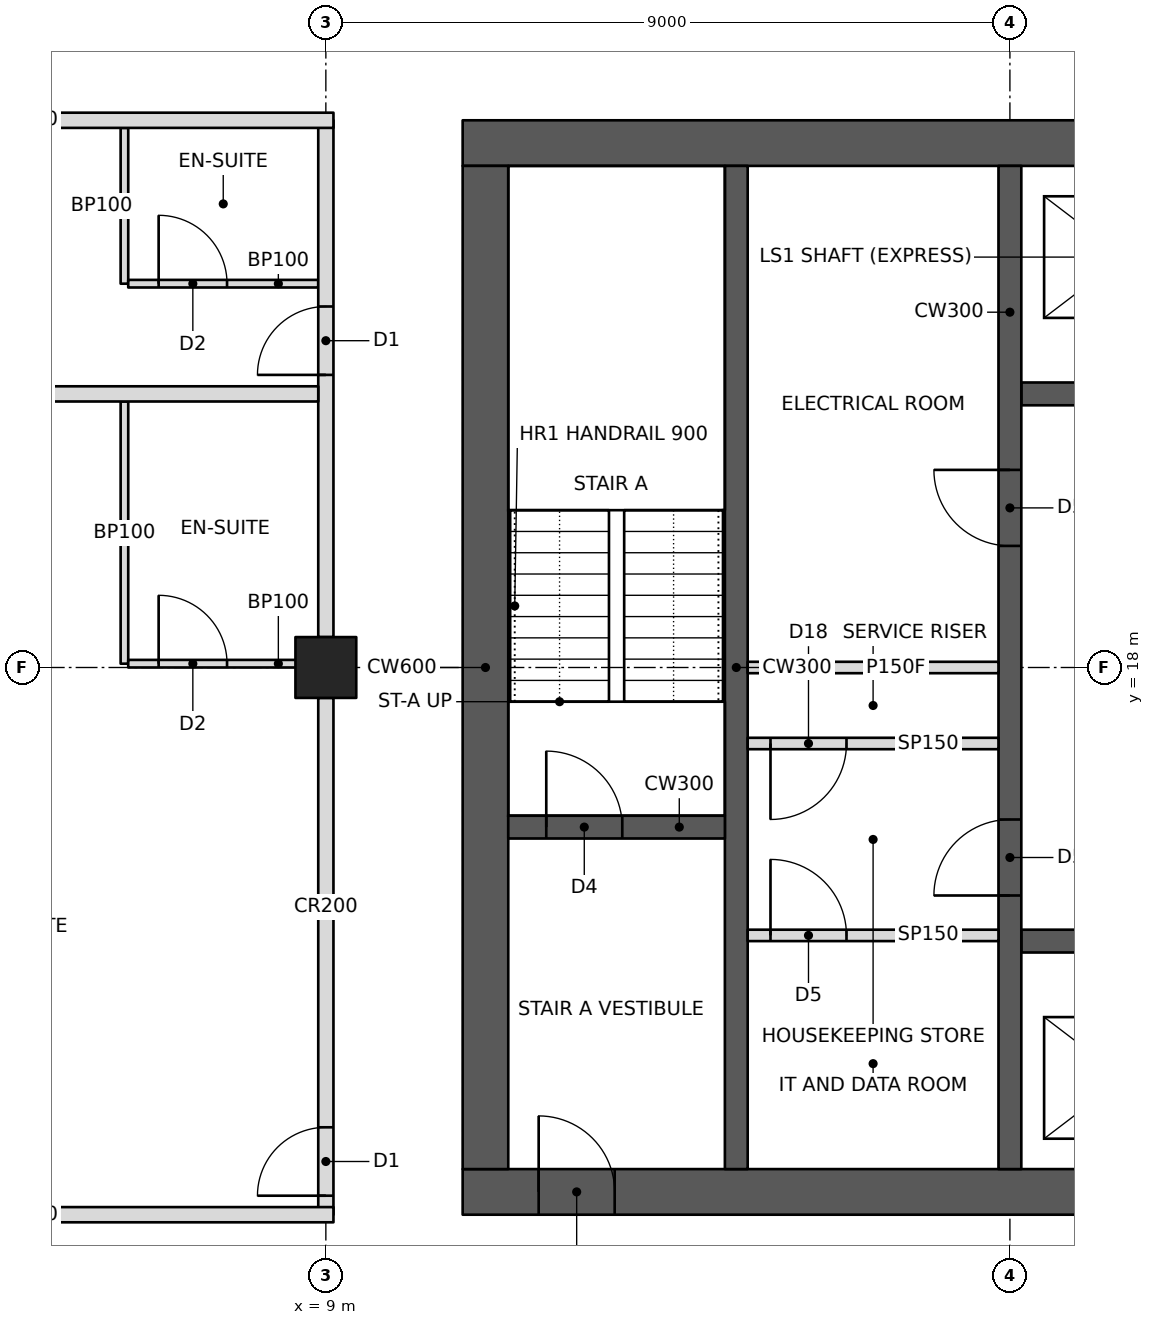
"""IFC4 building model, lengths in metres.
Left out: names, types, materials, properties, quantities, classifications, styles, units other than length and angle.
Written with IfcOpenShell. Run it as: python <this file> out.ifc"""

import sys

from ifc_helpers import new_model, si_unit, direction, frame, frame_2d, origin, origin_2d, place, context, subcontext, project, spatial, rectangle, hollow_rectangle, extrude, element, fill, save


model = new_model("IFC4")
c1 = context("Model", 3, precision=1e-05, world=origin(), true_north=direction((0.0, 1.0)))
c2 = subcontext(c1, "Body", "Model", "MODEL_VIEW")
j1 = project(units=[si_unit("LENGTHUNIT", "METRE"), si_unit("PLANEANGLEUNIT", "RADIAN")], contexts=[c1])
p1 = place(None, origin())
s1 = spatial("IfcSite", under=j1, at=p1, CompositionType="ELEMENT")
p2 = place(p1, origin())
s2 = spatial("IfcBuilding", under=s1, at=p2, CompositionType="ELEMENT")
p3 = place(p2, frame((0.0, 0.0, 124.8)))
s3 = spatial("IfcBuildingStorey", under=s2, at=p3, CompositionType="ELEMENT", Elevation=124.8)
p4 = place(p3, frame((9.0, 18.0, 0.0), z_axis=(0.0, 0.0, 1.0), x_axis=(1.0, 0.0, 0.0)))
e1 = element("IfcColumn", 1, at=p4, inside=s3, PredefinedType="COLUMN", context=c2, shape_type="SweptSolid", body=[
    extrude(hollow_rectangle(XDim=0.8, YDim=0.8, WallThickness=0.07, at=origin_2d()), origin(), (0.0, 0.0, 1.0), 3.4),
])
p5 = place(p3, frame((10.8, 11.1, 0.0), z_axis=(0.0, 0.0, 1.0), x_axis=(1.0, 0.0, 0.0)))
e2 = element("IfcWall", 2, at=p5, inside=s3, PredefinedType="SHEAR", context=c2, shape_type="SweptSolid", body=[
    extrude(rectangle(XDim=23.4, YDim=0.6, at=frame_2d((11.7, 0.0))), origin(), (0.0, 0.0, 1.0), 3.4),
])
p6 = place(p5, frame((1.0, 0.0, 0.0)))
e3 = element("IfcOpeningElement", 3, at=p6, cuts=e2, PredefinedType="OPENING", context=c2, shape_type="SweptSolid", body=[
    extrude(rectangle(XDim=1.0, YDim=2.1, at=frame_2d((0.5, 1.05))), frame((0.0, 0.31, 0.0), z_axis=(0.0, -1.0, 0.0), x_axis=(1.0, 0.0, 0.0)), (0.0, 0.0, 1.0), 0.62),
])
p7 = place(p5, frame((17.2, 0.0, 0.0)))
e4 = element("IfcOpeningElement", 4, at=p7, cuts=e2, PredefinedType="OPENING", context=c2, shape_type="SweptSolid", body=[
    extrude(rectangle(XDim=1.8, YDim=2.1, at=frame_2d((0.9, 1.05))), frame((0.0, 0.31, 0.0), z_axis=(0.0, -1.0, 0.0), x_axis=(1.0, 0.0, 0.0)), (0.0, 0.0, 1.0), 0.62),
])
p8 = place(p3, frame((10.8, 24.9, 0.0), z_axis=(0.0, 0.0, 1.0), x_axis=(1.0, 0.0, 0.0)))
e5 = element("IfcWall", 5, at=p8, inside=s3, PredefinedType="SHEAR", context=c2, shape_type="SweptSolid", body=[
    extrude(rectangle(XDim=23.4, YDim=0.6, at=frame_2d((11.7, 0.0))), origin(), (0.0, 0.0, 1.0), 3.4),
])
p9 = place(p8, frame((17.2, 0.0, 0.0)))
e6 = element("IfcOpeningElement", 6, at=p9, cuts=e5, PredefinedType="OPENING", context=c2, shape_type="SweptSolid", body=[
    extrude(rectangle(XDim=1.8, YDim=2.1, at=frame_2d((0.9, 1.05))), frame((0.0, 0.31, 0.0), z_axis=(0.0, -1.0, 0.0), x_axis=(1.0, 0.0, 0.0)), (0.0, 0.0, 1.0), 0.62),
])
p10 = place(p8, frame((21.1, 0.0, 0.0)))
e7 = element("IfcOpeningElement", 7, at=p10, cuts=e5, PredefinedType="OPENING", context=c2, shape_type="SweptSolid", body=[
    extrude(rectangle(XDim=1.0, YDim=2.1, at=frame_2d((0.5, 1.05))), frame((0.0, 0.31, 0.0), z_axis=(0.0, -1.0, 0.0), x_axis=(1.0, 0.0, 0.0)), (0.0, 0.0, 1.0), 0.62),
])
p11 = place(p3, frame((11.1, 11.4, 0.0), z_axis=(0.0, 0.0, 1.0), x_axis=(0.0, 1.0, 0.0)))
e8 = element("IfcWall", 8, at=p11, inside=s3, PredefinedType="SHEAR", context=c2, shape_type="SweptSolid", body=[
    extrude(rectangle(XDim=13.2, YDim=0.6, at=frame_2d((6.6, 0.0))), origin(), (0.0, 0.0, 1.0), 3.4),
])
p12 = place(p3, frame((14.4, 11.4, 0.0), z_axis=(0.0, 0.0, 1.0), x_axis=(0.0, 1.0, 0.0)))
e9 = element("IfcWall", 9, at=p12, inside=s3, PredefinedType="SHEAR", context=c2, shape_type="SweptSolid", body=[
    extrude(rectangle(XDim=13.2, YDim=0.3, at=frame_2d((6.6, 0.0))), origin(), (0.0, 0.0, 1.0), 3.4),
])
p13 = place(p3, frame((11.4, 15.9, 0.0), z_axis=(0.0, 0.0, 1.0), x_axis=(1.0, 0.0, 0.0)))
e10 = element("IfcWall", 10, at=p13, inside=s3, PredefinedType="SHEAR", context=c2, shape_type="SweptSolid", body=[
    extrude(rectangle(XDim=2.85, YDim=0.3, at=frame_2d((1.425, 0.0))), origin(), (0.0, 0.0, 1.0), 3.4),
])
p14 = place(p13, frame((0.5, 0.0, 0.0)))
e11 = element("IfcOpeningElement", 11, at=p14, cuts=e10, PredefinedType="OPENING", context=c2, shape_type="SweptSolid", body=[
    extrude(rectangle(XDim=1.0, YDim=2.1, at=frame_2d((0.5, 1.05))), frame((0.0, 0.16, 0.0), z_axis=(0.0, -1.0, 0.0), x_axis=(1.0, 0.0, 0.0)), (0.0, 0.0, 1.0), 0.32),
])
p15 = place(p3, frame((18.0, 11.4, 0.0), z_axis=(0.0, 0.0, 1.0), x_axis=(0.0, 1.0, 0.0)))
e12 = element("IfcWall", 12, at=p15, inside=s3, PredefinedType="SHEAR", context=c2, shape_type="SweptSolid", body=[
    extrude(rectangle(XDim=13.2, YDim=0.3, at=frame_2d((6.6, 0.0))), origin(), (0.0, 0.0, 1.0), 3.4),
])
p16 = place(p15, frame((3.6, 0.0, 0.0)))
e13 = element("IfcOpeningElement", 13, at=p16, cuts=e12, PredefinedType="OPENING", context=c2, shape_type="SweptSolid", body=[
    extrude(rectangle(XDim=1.0, YDim=2.1, at=frame_2d((0.5, 1.05))), frame((0.0, 0.16, 0.0), z_axis=(0.0, -1.0, 0.0), x_axis=(1.0, 0.0, 0.0)), (0.0, 0.0, 1.0), 0.32),
])
p17 = place(p15, frame((8.2, 0.0, 0.0)))
e14 = element("IfcOpeningElement", 14, at=p17, cuts=e12, PredefinedType="OPENING", context=c2, shape_type="SweptSolid", body=[
    extrude(rectangle(XDim=1.0, YDim=2.1, at=frame_2d((0.5, 1.05))), frame((0.0, 0.16, 0.0), z_axis=(0.0, -1.0, 0.0), x_axis=(1.0, 0.0, 0.0)), (0.0, 0.0, 1.0), 0.32),
])
p18 = place(p3, frame((14.55, 18.0, 0.0), z_axis=(0.0, 0.0, 1.0), x_axis=(1.0, 0.0, 0.0)))
e15 = element("IfcWall", 15, at=p18, inside=s3, PredefinedType="PARTITIONING", context=c2, shape_type="SweptSolid", body=[
    extrude(rectangle(XDim=3.3, YDim=0.15, at=frame_2d((1.65, 0.0))), origin(), (0.0, 0.0, 1.0), 3.2),
])
p19 = place(p3, frame((18.15, 14.4, 0.0), z_axis=(0.0, 0.0, 1.0), x_axis=(1.0, 0.0, 0.0)))
e16 = element("IfcWall", 16, at=p19, inside=s3, PredefinedType="SHEAR", context=c2, shape_type="SweptSolid", body=[
    extrude(rectangle(XDim=9.0, YDim=0.3, at=frame_2d((4.5, 0.0))), origin(), (0.0, 0.0, 1.0), 3.4),
])
p20 = place(p19, frame((0.8, 0.0, 0.0)))
e17 = element("IfcOpeningElement", 17, at=p20, cuts=e16, PredefinedType="OPENING", context=c2, shape_type="SweptSolid", body=[
    extrude(rectangle(XDim=1.1, YDim=2.1, at=frame_2d((0.55, 1.05))), frame((0.0, 0.16, 0.0), z_axis=(0.0, -1.0, 0.0), x_axis=(1.0, 0.0, 0.0)), (0.0, 0.0, 1.0), 0.32),
])
p21 = place(p19, frame((3.8, 0.0, 0.0)))
e18 = element("IfcOpeningElement", 18, at=p21, cuts=e16, PredefinedType="OPENING", context=c2, shape_type="SweptSolid", body=[
    extrude(rectangle(XDim=1.1, YDim=2.1, at=frame_2d((0.55, 1.05))), frame((0.0, 0.16, 0.0), z_axis=(0.0, -1.0, 0.0), x_axis=(1.0, 0.0, 0.0)), (0.0, 0.0, 1.0), 0.32),
])
p22 = place(p19, frame((6.75, 0.0, 0.0)))
e19 = element("IfcOpeningElement", 19, at=p22, cuts=e16, PredefinedType="OPENING", context=c2, shape_type="SweptSolid", body=[
    extrude(rectangle(XDim=1.2, YDim=2.1, at=frame_2d((0.6, 1.05))), frame((0.0, 0.16, 0.0), z_axis=(0.0, -1.0, 0.0), x_axis=(1.0, 0.0, 0.0)), (0.0, 0.0, 1.0), 0.32),
])
p23 = place(p3, frame((18.15, 21.6, 0.0), z_axis=(0.0, 0.0, 1.0), x_axis=(1.0, 0.0, 0.0)))
e20 = element("IfcWall", 20, at=p23, inside=s3, PredefinedType="SHEAR", context=c2, shape_type="SweptSolid", body=[
    extrude(rectangle(XDim=9.0, YDim=0.3, at=frame_2d((4.5, 0.0))), origin(), (0.0, 0.0, 1.0), 3.4),
])
p24 = place(p23, frame((6.75, 0.0, 0.0)))
e21 = element("IfcOpeningElement", 21, at=p24, cuts=e20, PredefinedType="OPENING", context=c2, shape_type="SweptSolid", body=[
    extrude(rectangle(XDim=1.2, YDim=2.1, at=frame_2d((0.6, 1.05))), frame((0.0, 0.16, 0.0), z_axis=(0.0, -1.0, 0.0), x_axis=(1.0, 0.0, 0.0)), (0.0, 0.0, 1.0), 0.32),
])
p25 = place(p3, frame((9.0, 10.8, 0.0), z_axis=(0.0, 0.0, 1.0), x_axis=(0.0, 1.0, 0.0)))
e22 = element("IfcWall", 22, at=p25, inside=s3, PredefinedType="PARTITIONING", context=c2, shape_type="SweptSolid", body=[
    extrude(rectangle(XDim=6.8, YDim=0.2, at=frame_2d((3.4, 0.0))), origin(), (0.0, 0.0, 1.0), 2.405),
])
p26 = place(p25, frame((0.25, 0.0, 0.0)))
e23 = element("IfcOpeningElement", 23, at=p26, cuts=e22, PredefinedType="OPENING", context=c2, shape_type="SweptSolid", body=[
    extrude(rectangle(XDim=0.9, YDim=2.1, at=frame_2d((0.45, 1.05))), frame((0.0, 0.11, 0.0), z_axis=(0.0, -1.0, 0.0), x_axis=(1.0, 0.0, 0.0)), (0.0, 0.0, 1.0), 0.22),
])
p27 = place(p3, frame((9.0, 18.4, 0.0), z_axis=(0.0, 0.0, 1.0), x_axis=(0.0, 1.0, 0.0)))
e24 = element("IfcWall", 24, at=p27, inside=s3, PredefinedType="PARTITIONING", context=c2, shape_type="SweptSolid", body=[
    extrude(rectangle(XDim=6.8, YDim=0.2, at=frame_2d((3.4, 0.0))), origin(), (0.0, 0.0, 1.0), 2.405),
])
p28 = place(p27, frame((3.45, 0.0, 0.0)))
e25 = element("IfcOpeningElement", 25, at=p28, cuts=e24, PredefinedType="OPENING", context=c2, shape_type="SweptSolid", body=[
    extrude(rectangle(XDim=0.9, YDim=2.1, at=frame_2d((0.45, 1.05))), frame((0.0, 0.11, 0.0), z_axis=(0.0, -1.0, 0.0), x_axis=(1.0, 0.0, 0.0)), (0.0, 0.0, 1.0), 0.22),
])
for number, where, z_axis, x_axis in (
    (26, (1.0, 10.8, 0.0), (0.0, 0.0, 1.0), (1.0, 0.0, 0.0)),
    (27, (1.0, 25.2, 0.0), (0.0, 0.0, 1.0), (1.0, 0.0, 0.0)),
):
    element("IfcWall", number, at=place(p3, frame(where, z_axis=z_axis, x_axis=x_axis)), inside=s3, PredefinedType="PARTITIONING", context=c2, shape_type="SweptSolid", body=[
        extrude(rectangle(XDim=8.1, YDim=0.2, at=frame_2d((4.05, 0.0))), origin(), (0.0, 0.0, 1.0), 2.404),
    ])
p29 = place(p3, frame((8.9, 21.6, 0.0), z_axis=(0.0, 0.0, 1.0), x_axis=(-1.0, 0.0, 0.0)))
e28 = element("IfcWall", 28, at=p29, inside=s3, PredefinedType="PARTITIONING", context=c2, shape_type="SweptSolid", body=[
    extrude(rectangle(XDim=7.9, YDim=0.2, at=frame_2d((3.95, 0.0))), origin(), (0.0, 0.0, 1.0), 2.404),
])
p30 = place(p3, frame((6.35, 18.05, 0.0), z_axis=(0.0, 0.0, 1.0), x_axis=(0.0, 1.0, 0.0)))
e29 = element("IfcWall", 29, at=p30, inside=s3, PredefinedType="PARTITIONING", context=c2, shape_type="SweptSolid", body=[
    extrude(rectangle(XDim=3.45, YDim=0.1, at=frame_2d((1.725, 0.0))), origin(), (0.0, 0.0, 1.0), 2.404),
])
p31 = place(p3, frame((8.9, 18.05, 0.0), z_axis=(0.0, 0.0, 1.0), x_axis=(-1.0, 0.0, 0.0)))
e30 = element("IfcWall", 30, at=p31, inside=s3, PredefinedType="PARTITIONING", context=c2, shape_type="SweptSolid", body=[
    extrude(rectangle(XDim=2.5, YDim=0.1, at=frame_2d((1.25, 0.0))), origin(), (0.0, 0.0, 1.0), 2.405),
])
p32 = place(p31, frame((1.2, 0.0, 0.0)))
e31 = element("IfcOpeningElement", 31, at=p32, cuts=e30, PredefinedType="OPENING", context=c2, shape_type="SweptSolid", body=[
    extrude(rectangle(XDim=0.9, YDim=2.1, at=frame_2d((0.45, 1.05))), frame((0.0, 0.06, 0.0), z_axis=(0.0, -1.0, 0.0), x_axis=(1.0, 0.0, 0.0)), (0.0, 0.0, 1.0), 0.12),
])
p33 = place(p3, frame((6.35, 23.05, 0.0), z_axis=(0.0, 0.0, 1.0), x_axis=(0.0, 1.0, 0.0)))
e32 = element("IfcWall", 32, at=p33, inside=s3, PredefinedType="PARTITIONING", context=c2, shape_type="SweptSolid", body=[
    extrude(rectangle(XDim=2.05, YDim=0.1, at=frame_2d((1.025, 0.0))), origin(), (0.0, 0.0, 1.0), 3.2),
])
p34 = place(p3, frame((8.9, 23.05, 0.0), z_axis=(0.0, 0.0, 1.0), x_axis=(-1.0, 0.0, 0.0)))
e33 = element("IfcWall", 33, at=p34, inside=s3, PredefinedType="PARTITIONING", context=c2, shape_type="SweptSolid", body=[
    extrude(rectangle(XDim=2.5, YDim=0.1, at=frame_2d((1.25, 0.0))), origin(), (0.0, 0.0, 1.0), 2.404),
])
p35 = place(p34, frame((1.2, 0.0, 0.0)))
e34 = element("IfcOpeningElement", 34, at=p35, cuts=e33, PredefinedType="OPENING", context=c2, shape_type="SweptSolid", body=[
    extrude(rectangle(XDim=0.9, YDim=2.1, at=frame_2d((0.45, 1.05))), frame((0.0, 0.06, 0.0), z_axis=(0.0, -1.0, 0.0), x_axis=(1.0, 0.0, 0.0)), (0.0, 0.0, 1.0), 0.12),
])
p36 = place(p3, frame((14.55, 17.0, 0.0), z_axis=(0.0, 0.0, 1.0), x_axis=(1.0, 0.0, 0.0)))
e35 = element("IfcWall", 35, at=p36, inside=s3, PredefinedType="PARTITIONING", context=c2, shape_type="SweptSolid", body=[
    extrude(rectangle(XDim=3.3, YDim=0.15, at=frame_2d((1.65, 0.0))), origin(), (0.0, 0.0, 1.0), 3.2),
])
p37 = place(p36, frame((0.3, 0.0, 0.0)))
e36 = element("IfcOpeningElement", 36, at=p37, cuts=e35, PredefinedType="OPENING", context=c2, shape_type="SweptSolid", body=[
    extrude(rectangle(XDim=1.0, YDim=2.1, at=frame_2d((0.5, 1.05))), frame((0.0, 0.085, 0.0), z_axis=(0.0, -1.0, 0.0), x_axis=(1.0, 0.0, 0.0)), (0.0, 0.0, 1.0), 0.17),
])
p38 = place(p3, frame((14.55, 14.475, 0.0), z_axis=(0.0, 0.0, 1.0), x_axis=(1.0, 0.0, 0.0)))
e37 = element("IfcWall", 37, at=p38, inside=s3, PredefinedType="PARTITIONING", context=c2, shape_type="SweptSolid", body=[
    extrude(rectangle(XDim=3.3, YDim=0.15, at=frame_2d((1.65, 0.0))), origin(), (0.0, 0.0, 1.0), 3.2),
])
p39 = place(p38, frame((0.3, 0.0, 0.0)))
e38 = element("IfcOpeningElement", 38, at=p39, cuts=e37, PredefinedType="OPENING", context=c2, shape_type="SweptSolid", body=[
    extrude(rectangle(XDim=1.0, YDim=2.1, at=frame_2d((0.5, 1.05))), frame((0.0, 0.085, 0.0), z_axis=(0.0, -1.0, 0.0), x_axis=(1.0, 0.0, 0.0)), (0.0, 0.0, 1.0), 0.17),
])
p40 = place(p32, frame((0.9, 0.0, 0.0), z_axis=(0.0, 0.0, 1.0), x_axis=(-1.0, 0.0, 0.0)))
e39 = element("IfcDoor", 39, at=p40, inside=s3, OperationType="SINGLE_SWING_LEFT", PredefinedType="DOOR", context=c2, shape_type="SweptSolid", body=[
    extrude(rectangle(XDim=0.9, YDim=2.1, at=frame_2d((0.45, 1.05))), frame((0.0, 0.025, 0.0), z_axis=(0.0, -1.0, 0.0), x_axis=(1.0, 0.0, 0.0)), (0.0, 0.0, 1.0), 0.05),
])
fill(e31, e39)
p41 = place(p26, origin())
e40 = element("IfcDoor", 40, at=p41, inside=s3, OperationType="SINGLE_SWING_LEFT", PredefinedType="DOOR", context=c2, shape_type="SweptSolid", body=[
    extrude(rectangle(XDim=0.9, YDim=2.1, at=frame_2d((0.45, 1.05))), frame((0.0, 0.025, 0.0), z_axis=(0.0, -1.0, 0.0), x_axis=(1.0, 0.0, 0.0)), (0.0, 0.0, 1.0), 0.05),
])
fill(e23, e40)
p42 = place(p35, frame((0.9, 0.0, 0.0), z_axis=(0.0, 0.0, 1.0), x_axis=(-1.0, 0.0, 0.0)))
e41 = element("IfcDoor", 41, at=p42, inside=s3, OperationType="SINGLE_SWING_LEFT", PredefinedType="DOOR", context=c2, shape_type="SweptSolid", body=[
    extrude(rectangle(XDim=0.9, YDim=2.1, at=frame_2d((0.45, 1.05))), frame((0.0, 0.025, 0.0), z_axis=(0.0, -1.0, 0.0), x_axis=(1.0, 0.0, 0.0)), (0.0, 0.0, 1.0), 0.05),
])
fill(e34, e41)
p43 = place(p28, origin())
e42 = element("IfcDoor", 42, at=p43, inside=s3, OperationType="SINGLE_SWING_LEFT", PredefinedType="DOOR", context=c2, shape_type="SweptSolid", body=[
    extrude(rectangle(XDim=0.9, YDim=2.1, at=frame_2d((0.45, 1.05))), frame((0.0, 0.025, 0.0), z_axis=(0.0, -1.0, 0.0), x_axis=(1.0, 0.0, 0.0)), (0.0, 0.0, 1.0), 0.05),
])
fill(e25, e42)
p44 = place(p37, frame((1.0, 0.0, 0.0), z_axis=(0.0, 0.0, 1.0), x_axis=(-1.0, 0.0, 0.0)))
e43 = element("IfcDoor", 43, at=p44, inside=s3, OperationType="SINGLE_SWING_RIGHT", PredefinedType="DOOR", context=c2, shape_type="SweptSolid", body=[
    extrude(rectangle(XDim=1.0, YDim=2.1, at=frame_2d((0.5, 1.05))), frame((0.0, 0.025, 0.0), z_axis=(0.0, -1.0, 0.0), x_axis=(1.0, 0.0, 0.0)), (0.0, 0.0, 1.0), 0.05),
])
fill(e36, e43)
p45 = place(p39, origin())
e44 = element("IfcDoor", 44, at=p45, inside=s3, OperationType="SINGLE_SWING_LEFT", PredefinedType="DOOR", context=c2, shape_type="SweptSolid", body=[
    extrude(rectangle(XDim=1.0, YDim=2.1, at=frame_2d((0.5, 1.05))), frame((0.0, 0.025, 0.0), z_axis=(0.0, -1.0, 0.0), x_axis=(1.0, 0.0, 0.0)), (0.0, 0.0, 1.0), 0.05),
])
fill(e38, e44)
p46 = place(p6, origin())
e45 = element("IfcDoor", 45, at=p46, inside=s3, OperationType="SINGLE_SWING_LEFT", PredefinedType="DOOR", context=c2, shape_type="SweptSolid", body=[
    extrude(rectangle(XDim=1.0, YDim=2.1, at=frame_2d((0.5, 1.05))), frame((0.0, 0.025, 0.0), z_axis=(0.0, -1.0, 0.0), x_axis=(1.0, 0.0, 0.0)), (0.0, 0.0, 1.0), 0.05),
])
fill(e3, e45)
p47 = place(p14, origin())
e46 = element("IfcDoor", 46, at=p47, inside=s3, OperationType="SINGLE_SWING_LEFT", PredefinedType="DOOR", context=c2, shape_type="SweptSolid", body=[
    extrude(rectangle(XDim=1.0, YDim=2.1, at=frame_2d((0.5, 1.05))), frame((0.0, 0.025, 0.0), z_axis=(0.0, -1.0, 0.0), x_axis=(1.0, 0.0, 0.0)), (0.0, 0.0, 1.0), 0.05),
])
fill(e11, e46)
p48 = place(p16, origin())
e47 = element("IfcDoor", 47, at=p48, inside=s3, OperationType="SINGLE_SWING_LEFT", PredefinedType="DOOR", context=c2, shape_type="SweptSolid", body=[
    extrude(rectangle(XDim=1.0, YDim=2.1, at=frame_2d((0.5, 1.05))), frame((0.0, 0.025, 0.0), z_axis=(0.0, -1.0, 0.0), x_axis=(1.0, 0.0, 0.0)), (0.0, 0.0, 1.0), 0.05),
])
fill(e13, e47)
p49 = place(p17, origin())
e48 = element("IfcDoor", 48, at=p49, inside=s3, OperationType="SINGLE_SWING_RIGHT", PredefinedType="DOOR", context=c2, shape_type="SweptSolid", body=[
    extrude(rectangle(XDim=1.0, YDim=2.1, at=frame_2d((0.5, 1.05))), frame((0.0, 0.025, 0.0), z_axis=(0.0, -1.0, 0.0), x_axis=(1.0, 0.0, 0.0)), (0.0, 0.0, 1.0), 0.05),
])
fill(e14, e48)
save(model, sys.argv[1])
